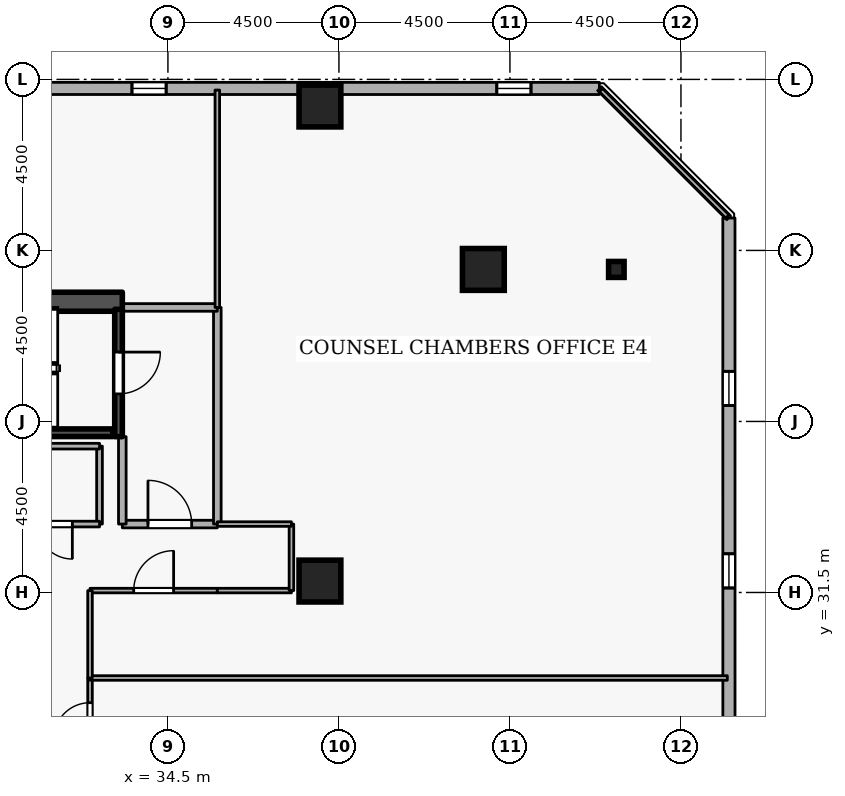
"""IFC4 building model, lengths in metres.
Left out: names, types, materials, properties, quantities, classifications, styles, units other than length and angle.
Written with IfcOpenShell. Run it as: python <this file> out.ifc"""

import sys

from ifc_helpers import new_model, si_unit, direction, frame, frame_2d, origin, origin_2d, place, context, subcontext, project, spatial, rectangle, i_section, extrude, element, fill, save


model = new_model("IFC4")
c1 = context("Model", 3, precision=1e-05, world=origin(), true_north=direction((0.0, 1.0)))
c2 = subcontext(c1, "Body", "Model", "MODEL_VIEW")
j1 = project(units=[si_unit("LENGTHUNIT", "METRE"), si_unit("PLANEANGLEUNIT", "RADIAN")], contexts=[c1])
p1 = place(None, origin())
s1 = spatial("IfcSite", under=j1, at=p1, CompositionType="ELEMENT")
p2 = place(p1, origin())
s2 = spatial("IfcBuilding", under=s1, at=p2, CompositionType="ELEMENT")
p3 = place(p2, frame((0.0, 0.0, 159.9)))
s3 = spatial("IfcBuildingStorey", under=s2, at=p3, CompositionType="ELEMENT", Elevation=159.9)
p4 = place(p3, frame((17.7, 39.15, 0.0), z_axis=(0.0, 0.0, 1.0), x_axis=(1.0, 0.0, 0.0)))
e1 = element("IfcWall", 1, at=p4, inside=s3, PredefinedType="SHEAR", context=c2, shape_type="SweptSolid", body=[
    extrude(rectangle(XDim=15.6, YDim=0.5, at=frame_2d((7.8, 0.0))), origin(), (0.0, 0.0, 1.0), 3.6),
])
for number, where, z_axis, x_axis in (
    (2, (42.8, 40.0, 0.0), (0.0, 0.0, 1.0), (1.0, 0.0, 0.0)),
    (3, (38.5, 44.3, 0.0), (0.0, 0.0, 1.0), (1.0, 0.0, 0.0)),
    (4, (38.5, 31.8, 0.0), (0.0, 0.0, 1.0), (1.0, 0.0, 0.0)),
):
    element("IfcColumn", number, at=place(p3, frame(where, z_axis=z_axis, x_axis=x_axis)), inside=s3, PredefinedType="COLUMN", context=c2, shape_type="SweptSolid", body=[
        extrude(rectangle(XDim=1.1, YDim=1.1, at=origin_2d()), origin(), (0.0, 0.0, 1.0), 3.6),
    ])
p5 = place(p3, frame((46.3, 40.0, 0.0), z_axis=(0.0, 0.0, 1.0), x_axis=(1.0, 0.0, 0.0)))
e5 = element("IfcColumn", 5, at=p5, inside=s3, PredefinedType="COLUMN", context=c2, shape_type="SweptSolid", body=[
    extrude(i_section(OverallWidth=0.407, OverallDepth=0.419, WebThickness=0.031, FlangeThickness=0.049, FilletRadius=0.015, at=origin_2d()), origin(), (0.0, 0.0, 1.0), 3.6),
])
p6 = place(p3, frame((49.265, 5.819, 0.0), z_axis=(0.0, 0.0, 1.0), x_axis=(-7.5574884e-05, 0.999999997144, 0.0)))
e6 = element("IfcWall", 6, at=p6, inside=s3, PredefinedType="STANDARD", context=c2, shape_type="SweptSolid", body=[
    extrude(rectangle(XDim=35.535, YDim=0.32, at=frame_2d((17.768, 0.0))), origin(), (0.0, 0.0, 1.0), 2.7),
])
p7 = place(p6, frame((1.8, 0.0, 0.72)))
e7 = element("IfcOpeningElement", 7, at=p7, cuts=e6, PredefinedType="OPENING", context=c2, shape_type="SweptSolid", body=[
    extrude(rectangle(XDim=0.9, YDim=1.75, at=frame_2d((0.45, 0.875))), frame((0.0, 0.17, 0.0), z_axis=(0.0, -1.0, 0.0), x_axis=(1.0, 0.0, 0.0)), (0.0, 0.0, 1.0), 0.34),
])
p8 = place(p6, frame((6.6, 0.0, 0.72)))
e8 = element("IfcOpeningElement", 8, at=p8, cuts=e6, PredefinedType="OPENING", context=c2, shape_type="SweptSolid", body=[
    extrude(rectangle(XDim=0.9, YDim=1.75, at=frame_2d((0.45, 0.875))), frame((0.0, 0.17, 0.0), z_axis=(0.0, -1.0, 0.0), x_axis=(1.0, 0.0, 0.0)), (0.0, 0.0, 1.0), 0.34),
])
p9 = place(p6, frame((11.4, 0.0, 0.72)))
e9 = element("IfcOpeningElement", 9, at=p9, cuts=e6, PredefinedType="OPENING", context=c2, shape_type="SweptSolid", body=[
    extrude(rectangle(XDim=0.9, YDim=1.75, at=frame_2d((0.45, 0.875))), frame((0.0, 0.17, 0.0), z_axis=(0.0, -1.0, 0.0), x_axis=(1.0, 0.0, 0.0)), (0.0, 0.0, 1.0), 0.34),
])
p10 = place(p6, frame((16.2, 0.0, 0.72)))
e10 = element("IfcOpeningElement", 10, at=p10, cuts=e6, PredefinedType="OPENING", context=c2, shape_type="SweptSolid", body=[
    extrude(rectangle(XDim=0.9, YDim=1.75, at=frame_2d((0.45, 0.875))), frame((0.0, 0.17, 0.0), z_axis=(0.0, -1.0, 0.0), x_axis=(1.0, 0.0, 0.0)), (0.0, 0.0, 1.0), 0.34),
])
p11 = place(p6, frame((25.8, 0.0, 0.72)))
e11 = element("IfcOpeningElement", 11, at=p11, cuts=e6, PredefinedType="OPENING", context=c2, shape_type="SweptSolid", body=[
    extrude(rectangle(XDim=0.9, YDim=1.75, at=frame_2d((0.45, 0.875))), frame((0.0, 0.17, 0.0), z_axis=(0.0, -1.0, 0.0), x_axis=(1.0, 0.0, 0.0)), (0.0, 0.0, 1.0), 0.34),
])
p12 = place(p6, frame((30.6, 0.0, 0.72)))
e12 = element("IfcOpeningElement", 12, at=p12, cuts=e6, PredefinedType="OPENING", context=c2, shape_type="SweptSolid", body=[
    extrude(rectangle(XDim=0.9, YDim=1.75, at=frame_2d((0.45, 0.875))), frame((0.0, 0.17, 0.0), z_axis=(0.0, -1.0, 0.0), x_axis=(1.0, 0.0, 0.0)), (0.0, 0.0, 1.0), 0.34),
])
p13 = place(p3, frame((45.854, 44.762, 0.0), z_axis=(0.0, 0.0, 1.0), x_axis=(-0.999999997144, 7.5574884e-05, 0.0)))
e13 = element("IfcWall", 13, at=p13, inside=s3, PredefinedType="STANDARD", context=c2, shape_type="SweptSolid", body=[
    extrude(rectangle(XDim=35.535, YDim=0.32, at=frame_2d((17.768, 0.0))), origin(), (0.0, 0.0, 1.0), 2.7),
])
p14 = place(p13, frame((1.8, 0.0, 0.72)))
e14 = element("IfcOpeningElement", 14, at=p14, cuts=e13, PredefinedType="OPENING", context=c2, shape_type="SweptSolid", body=[
    extrude(rectangle(XDim=0.9, YDim=1.75, at=frame_2d((0.45, 0.875))), frame((0.0, 0.17, 0.0), z_axis=(0.0, -1.0, 0.0), x_axis=(1.0, 0.0, 0.0)), (0.0, 0.0, 1.0), 0.34),
])
p15 = place(p13, frame((11.4, 0.0, 0.72)))
e15 = element("IfcOpeningElement", 15, at=p15, cuts=e13, PredefinedType="OPENING", context=c2, shape_type="SweptSolid", body=[
    extrude(rectangle(XDim=0.9, YDim=1.75, at=frame_2d((0.45, 0.875))), frame((0.0, 0.17, 0.0), z_axis=(0.0, -1.0, 0.0), x_axis=(1.0, 0.0, 0.0)), (0.0, 0.0, 1.0), 0.34),
])
p16 = place(p13, frame((16.2, 0.0, 0.72)))
e16 = element("IfcOpeningElement", 16, at=p16, cuts=e13, PredefinedType="OPENING", context=c2, shape_type="SweptSolid", body=[
    extrude(rectangle(XDim=0.9, YDim=1.75, at=frame_2d((0.45, 0.875))), frame((0.0, 0.17, 0.0), z_axis=(0.0, -1.0, 0.0), x_axis=(1.0, 0.0, 0.0)), (0.0, 0.0, 1.0), 0.34),
])
p17 = place(p13, frame((25.8, 0.0, 0.72)))
e17 = element("IfcOpeningElement", 17, at=p17, cuts=e13, PredefinedType="OPENING", context=c2, shape_type="SweptSolid", body=[
    extrude(rectangle(XDim=0.9, YDim=1.75, at=frame_2d((0.45, 0.875))), frame((0.0, 0.17, 0.0), z_axis=(0.0, -1.0, 0.0), x_axis=(1.0, 0.0, 0.0)), (0.0, 0.0, 1.0), 0.34),
])
p18 = place(p13, frame((30.6, 0.0, 0.72)))
e18 = element("IfcOpeningElement", 18, at=p18, cuts=e13, PredefinedType="OPENING", context=c2, shape_type="SweptSolid", body=[
    extrude(rectangle(XDim=0.9, YDim=1.75, at=frame_2d((0.45, 0.875))), frame((0.0, 0.17, 0.0), z_axis=(0.0, -1.0, 0.0), x_axis=(1.0, 0.0, 0.0)), (0.0, 0.0, 1.0), 0.34),
])
p19 = place(p3, frame((33.2, 38.95, 0.0), z_axis=(0.0, 0.0, 1.0), x_axis=(0.0, -1.0, 0.0)))
e19 = element("IfcWall", 19, at=p19, inside=s3, PredefinedType="SHEAR", context=c2, shape_type="SweptSolid", body=[
    extrude(rectangle(XDim=3.35, YDim=0.2, at=frame_2d((1.675, 0.0))), origin(), (0.0, 0.0, 1.0), 3.6),
])
p20 = place(p19, frame((1.125, 0.0, 0.0)))
e20 = element("IfcOpeningElement", 20, at=p20, cuts=e19, PredefinedType="OPENING", context=c2, shape_type="SweptSolid", body=[
    extrude(rectangle(XDim=1.1, YDim=2.1, at=frame_2d((0.55, 1.05))), frame((0.0, 0.11, 0.0), z_axis=(0.0, -1.0, 0.0), x_axis=(1.0, 0.0, 0.0)), (0.0, 0.0, 1.0), 0.22),
])
p21 = place(p3, frame((25.95, 35.703, 0.0), z_axis=(0.0, 0.0, 1.0), x_axis=(1.0, 0.0, 0.0)))
e21 = element("IfcWall", 21, at=p21, inside=s3, PredefinedType="SHEAR", context=c2, shape_type="SweptSolid", body=[
    extrude(rectangle(XDim=7.1, YDim=0.2, at=frame_2d((3.55, 0.0))), origin(), (0.0, 0.0, 1.0), 3.6),
])
p22 = place(p3, frame((33.3, 33.3, 0.0), z_axis=(0.0, 0.0, 1.0), x_axis=(1.0, 0.0, 0.0)))
e22 = element("IfcWall", 22, at=p22, inside=s3, PredefinedType="STANDARD", context=c2, shape_type="SweptSolid", body=[
    extrude(rectangle(XDim=2.5, YDim=0.2, at=frame_2d((1.25, 0.0))), origin(), (0.0, 0.0, 1.0), 3.34),
])
p23 = place(p22, frame((0.675, 0.0, 0.0)))
e23 = element("IfcOpeningElement", 23, at=p23, cuts=e22, PredefinedType="OPENING", context=c2, shape_type="SweptSolid", body=[
    extrude(rectangle(XDim=1.15, YDim=2.1, at=frame_2d((0.575, 1.05))), frame((0.0, 0.11, 0.0), z_axis=(0.0, -1.0, 0.0), x_axis=(1.0, 0.0, 0.0)), (0.0, 0.0, 1.0), 0.22),
])
p24 = place(p3, frame((35.8, 33.3, 0.0), z_axis=(0.0, 0.0, 1.0), x_axis=(0.0, 1.0, 0.0)))
e24 = element("IfcWall", 24, at=p24, inside=s3, PredefinedType="STANDARD", context=c2, shape_type="SweptSolid", body=[
    extrude(rectangle(XDim=5.7, YDim=0.2, at=frame_2d((2.85, 0.0))), origin(), (0.0, 0.0, 1.0), 3.34),
])
p25 = place(p3, frame((35.8, 39.0, 0.0), z_axis=(0.0, 0.0, 1.0), x_axis=(-1.0, 0.0, 0.0)))
e25 = element("IfcWall", 25, at=p25, inside=s3, PredefinedType="STANDARD", context=c2, shape_type="SweptSolid", body=[
    extrude(rectangle(XDim=2.5, YDim=0.2, at=frame_2d((1.25, 0.0))), origin(), (0.0, 0.0, 1.0), 3.34),
])
p26 = place(p3, frame((33.3, 35.6, 0.0), z_axis=(0.0, 0.0, 1.0), x_axis=(0.0, -1.0, 0.0)))
e26 = element("IfcWall", 26, at=p26, inside=s3, PredefinedType="STANDARD", context=c2, shape_type="SweptSolid", body=[
    extrude(rectangle(XDim=2.3, YDim=0.2, at=frame_2d((1.15, 0.0))), origin(), (0.0, 0.0, 1.0), 2.545),
])
p27 = place(p3, frame((32.7, 35.35, 0.0), z_axis=(0.0, 0.0, 1.0), x_axis=(0.0, -1.0, 0.0)))
e27 = element("IfcWall", 27, at=p27, inside=s3, PredefinedType="PARTITIONING", context=c2, shape_type="SweptSolid", body=[
    extrude(rectangle(XDim=2.05, YDim=0.15, at=frame_2d((1.025, 0.0))), origin(), (0.0, 0.0, 1.0), 2.545),
])
p28 = place(p3, frame((32.7, 33.3, 0.0), z_axis=(0.0, 0.0, 1.0), x_axis=(-1.0, 0.0, 0.0)))
e28 = element("IfcWall", 28, at=p28, inside=s3, PredefinedType="PARTITIONING", context=c2, shape_type="SweptSolid", body=[
    extrude(rectangle(XDim=2.35, YDim=0.15, at=frame_2d((1.175, 0.0))), origin(), (0.0, 0.0, 1.0), 3.34),
])
p29 = place(p28, frame((0.715, 0.0, 0.0)))
e29 = element("IfcOpeningElement", 29, at=p29, cuts=e28, PredefinedType="OPENING", context=c2, shape_type="SweptSolid", body=[
    extrude(rectangle(XDim=0.92, YDim=2.08, at=frame_2d((0.46, 1.04))), frame((0.0, 0.085, 0.0), z_axis=(0.0, -1.0, 0.0), x_axis=(1.0, 0.0, 0.0)), (0.0, 0.0, 1.0), 0.17),
])
p30 = place(p3, frame((30.35, 35.35, 0.0), z_axis=(0.0, 0.0, 1.0), x_axis=(1.0, 0.0, 0.0)))
e30 = element("IfcWall", 30, at=p30, inside=s3, PredefinedType="PARTITIONING", context=c2, shape_type="SweptSolid", body=[
    extrude(rectangle(XDim=2.35, YDim=0.15, at=frame_2d((1.175, 0.0))), origin(), (0.0, 0.0, 1.0), 3.34),
])
p31 = place(p3, frame((32.45, 27.0, 0.0), z_axis=(0.0, 0.0, 1.0), x_axis=(0.0, 1.0, 0.0)))
e31 = element("IfcWall", 31, at=p31, inside=s3, PredefinedType="PARTITIONING", context=c2, shape_type="SweptSolid", body=[
    extrude(rectangle(XDim=2.25, YDim=0.12, at=frame_2d((1.125, 0.0))), origin(), (0.0, 0.0, 1.0), 3.34),
])
p32 = place(p31, frame((0.65, 0.0, 0.0)))
e32 = element("IfcOpeningElement", 32, at=p32, cuts=e31, PredefinedType="OPENING", context=c2, shape_type="SweptSolid", body=[
    extrude(rectangle(XDim=0.95, YDim=2.1, at=frame_2d((0.475, 1.05))), frame((0.0, 0.07, 0.0), z_axis=(0.0, -1.0, 0.0), x_axis=(1.0, 0.0, 0.0)), (0.0, 0.0, 1.0), 0.14),
])
p33 = place(p3, frame((32.45, 29.25, 0.0), z_axis=(0.0, 0.0, 1.0), x_axis=(1.0, 0.0, 0.0)))
e33 = element("IfcWall", 33, at=p33, inside=s3, PredefinedType="PARTITIONING", context=c2, shape_type="SweptSolid", body=[
    extrude(rectangle(XDim=16.77, YDim=0.12, at=frame_2d((8.385, 0.0))), origin(), (0.0, 0.0, 1.0), 3.34),
])
p34 = place(p3, frame((32.45, 31.55, 0.0), z_axis=(0.0, 0.0, 1.0), x_axis=(1.0, 0.0, 0.0)))
e34 = element("IfcWall", 34, at=p34, inside=s3, PredefinedType="PARTITIONING", context=c2, shape_type="SweptSolid", body=[
    extrude(rectangle(XDim=3.35, YDim=0.12, at=frame_2d((1.675, 0.0))), origin(), (0.0, 0.0, 1.0), 3.34),
])
p35 = place(p34, frame((1.15, 0.0, 0.0)))
e35 = element("IfcOpeningElement", 35, at=p35, cuts=e34, PredefinedType="OPENING", context=c2, shape_type="SweptSolid", body=[
    extrude(rectangle(XDim=1.05, YDim=2.1, at=frame_2d((0.525, 1.05))), frame((0.0, 0.07, 0.0), z_axis=(0.0, -1.0, 0.0), x_axis=(1.0, 0.0, 0.0)), (0.0, 0.0, 1.0), 0.14),
])
p36 = place(p3, frame((35.8, 31.55, 0.0), z_axis=(0.0, 0.0, 1.0), x_axis=(1.0, 0.0, 0.0)))
e36 = element("IfcWall", 36, at=p36, inside=s3, PredefinedType="PARTITIONING", context=c2, shape_type="SweptSolid", body=[
    extrude(rectangle(XDim=1.95, YDim=0.12, at=frame_2d((0.975, 0.0))), origin(), (0.0, 0.0, 1.0), 3.34),
])
p37 = place(p3, frame((37.75, 31.55, 0.0), z_axis=(0.0, 0.0, 1.0), x_axis=(0.0, 1.0, 0.0)))
e37 = element("IfcWall", 37, at=p37, inside=s3, PredefinedType="PARTITIONING", context=c2, shape_type="SweptSolid", body=[
    extrude(rectangle(XDim=1.75, YDim=0.12, at=frame_2d((0.875, 0.0))), origin(), (0.0, 0.0, 1.0), 3.34),
])
p38 = place(p3, frame((37.75, 33.3, 0.0), z_axis=(0.0, 0.0, 1.0), x_axis=(-1.0, 0.0, 0.0)))
e38 = element("IfcWall", 38, at=p38, inside=s3, PredefinedType="PARTITIONING", context=c2, shape_type="SweptSolid", body=[
    extrude(rectangle(XDim=1.95, YDim=0.12, at=frame_2d((0.975, 0.0))), origin(), (0.0, 0.0, 1.0), 3.34),
])
p39 = place(p3, frame((35.8, 39.0, 0.0), z_axis=(0.0, 0.0, 1.0), x_axis=(0.0, 1.0, 0.0)))
e39 = element("IfcWall", 39, at=p39, inside=s3, PredefinedType="PARTITIONING", context=c2, shape_type="SweptSolid", body=[
    extrude(rectangle(XDim=5.72, YDim=0.12, at=frame_2d((2.86, 0.0))), origin(), (0.0, 0.0, 1.0), 3.34),
])
p40 = place(p3, frame((45.894, 44.72, 0.0), z_axis=(0.0, 0.0, 1.0), x_axis=(0.707106781187, -0.707106781187, 0.0)))
e40 = element("IfcWall", 40, at=p40, inside=s3, PredefinedType="PARTITIONING", context=c2, shape_type="SweptSolid", body=[
    extrude(rectangle(XDim=4.703, YDim=0.12, at=frame_2d((2.352, 0.0))), origin(), (0.0, 0.0, 1.0), 3.34),
])
p41 = place(p3, frame((32.45, 29.25, 0.0), z_axis=(0.0, 0.0, 1.0), x_axis=(0.0, 1.0, 0.0)))
e41 = element("IfcWall", 41, at=p41, inside=s3, PredefinedType="PARTITIONING", context=c2, shape_type="SweptSolid", body=[
    extrude(rectangle(XDim=2.3, YDim=0.12, at=frame_2d((1.15, 0.0))), origin(), (0.0, 0.0, 1.0), 3.34),
])
p42 = place(p11, origin())
e42 = element("IfcWindow", 42, at=p42, inside=s3, PartitioningType="SINGLE_PANEL", PredefinedType="WINDOW", context=c2, shape_type="SweptSolid", body=[
    extrude(rectangle(XDim=0.9, YDim=1.75, at=frame_2d((0.45, 0.875))), frame((0.0, 0.03, 0.0), z_axis=(0.0, -1.0, 0.0), x_axis=(1.0, 0.0, 0.0)), (0.0, 0.0, 1.0), 0.06),
])
fill(e11, e42)
p43 = place(p12, origin())
e43 = element("IfcWindow", 43, at=p43, inside=s3, PartitioningType="SINGLE_PANEL", PredefinedType="WINDOW", context=c2, shape_type="SweptSolid", body=[
    extrude(rectangle(XDim=0.9, YDim=1.75, at=frame_2d((0.45, 0.875))), frame((0.0, 0.03, 0.0), z_axis=(0.0, -1.0, 0.0), x_axis=(1.0, 0.0, 0.0)), (0.0, 0.0, 1.0), 0.06),
])
fill(e12, e43)
p44 = place(p14, origin())
e44 = element("IfcWindow", 44, at=p44, inside=s3, PartitioningType="SINGLE_PANEL", PredefinedType="WINDOW", context=c2, shape_type="SweptSolid", body=[
    extrude(rectangle(XDim=0.9, YDim=1.75, at=frame_2d((0.45, 0.875))), frame((0.0, 0.03, 0.0), z_axis=(0.0, -1.0, 0.0), x_axis=(1.0, 0.0, 0.0)), (0.0, 0.0, 1.0), 0.06),
])
fill(e14, e44)
p45 = place(p15, origin())
e45 = element("IfcWindow", 45, at=p45, inside=s3, PartitioningType="SINGLE_PANEL", PredefinedType="WINDOW", context=c2, shape_type="SweptSolid", body=[
    extrude(rectangle(XDim=0.9, YDim=1.75, at=frame_2d((0.45, 0.875))), frame((0.0, 0.03, 0.0), z_axis=(0.0, -1.0, 0.0), x_axis=(1.0, 0.0, 0.0)), (0.0, 0.0, 1.0), 0.06),
])
fill(e15, e45)
p46 = place(p20, origin())
e46 = element("IfcDoor", 46, at=p46, inside=s3, OperationType="SINGLE_SWING_LEFT", PredefinedType="DOOR", context=c2, shape_type="SweptSolid", body=[
    extrude(rectangle(XDim=1.1, YDim=2.1, at=frame_2d((0.55, 1.05))), frame((0.0, 0.025, 0.0), z_axis=(0.0, -1.0, 0.0), x_axis=(1.0, 0.0, 0.0)), (0.0, 0.0, 1.0), 0.05),
])
fill(e20, e46)
p47 = place(p23, origin())
e47 = element("IfcDoor", 47, at=p47, inside=s3, OperationType="SINGLE_SWING_LEFT", PredefinedType="DOOR", context=c2, shape_type="SweptSolid", body=[
    extrude(rectangle(XDim=1.15, YDim=2.1, at=frame_2d((0.575, 1.05))), frame((0.0, 0.025, 0.0), z_axis=(0.0, -1.0, 0.0), x_axis=(1.0, 0.0, 0.0)), (0.0, 0.0, 1.0), 0.05),
])
fill(e23, e47)
p48 = place(p29, origin())
e48 = element("IfcDoor", 48, at=p48, inside=s3, OperationType="SINGLE_SWING_LEFT", PredefinedType="DOOR", context=c2, shape_type="SweptSolid", body=[
    extrude(rectangle(XDim=0.92, YDim=2.08, at=frame_2d((0.46, 1.04))), frame((0.0, 0.025, 0.0), z_axis=(0.0, -1.0, 0.0), x_axis=(1.0, 0.0, 0.0)), (0.0, 0.0, 1.0), 0.05),
])
fill(e29, e48)
p49 = place(p32, origin())
e49 = element("IfcDoor", 49, at=p49, inside=s3, OperationType="SINGLE_SWING_LEFT", PredefinedType="DOOR", context=c2, shape_type="SweptSolid", body=[
    extrude(rectangle(XDim=0.95, YDim=2.1, at=frame_2d((0.475, 1.05))), frame((0.0, 0.025, 0.0), z_axis=(0.0, -1.0, 0.0), x_axis=(1.0, 0.0, 0.0)), (0.0, 0.0, 1.0), 0.05),
])
fill(e32, e49)
p50 = place(p35, origin())
e50 = element("IfcDoor", 50, at=p50, inside=s3, OperationType="SINGLE_SWING_RIGHT", PredefinedType="DOOR", context=c2, shape_type="SweptSolid", body=[
    extrude(rectangle(XDim=1.05, YDim=2.1, at=frame_2d((0.525, 1.05))), frame((0.0, 0.025, 0.0), z_axis=(0.0, -1.0, 0.0), x_axis=(1.0, 0.0, 0.0)), (0.0, 0.0, 1.0), 0.05),
])
fill(e35, e50)
save(model, sys.argv[1])
